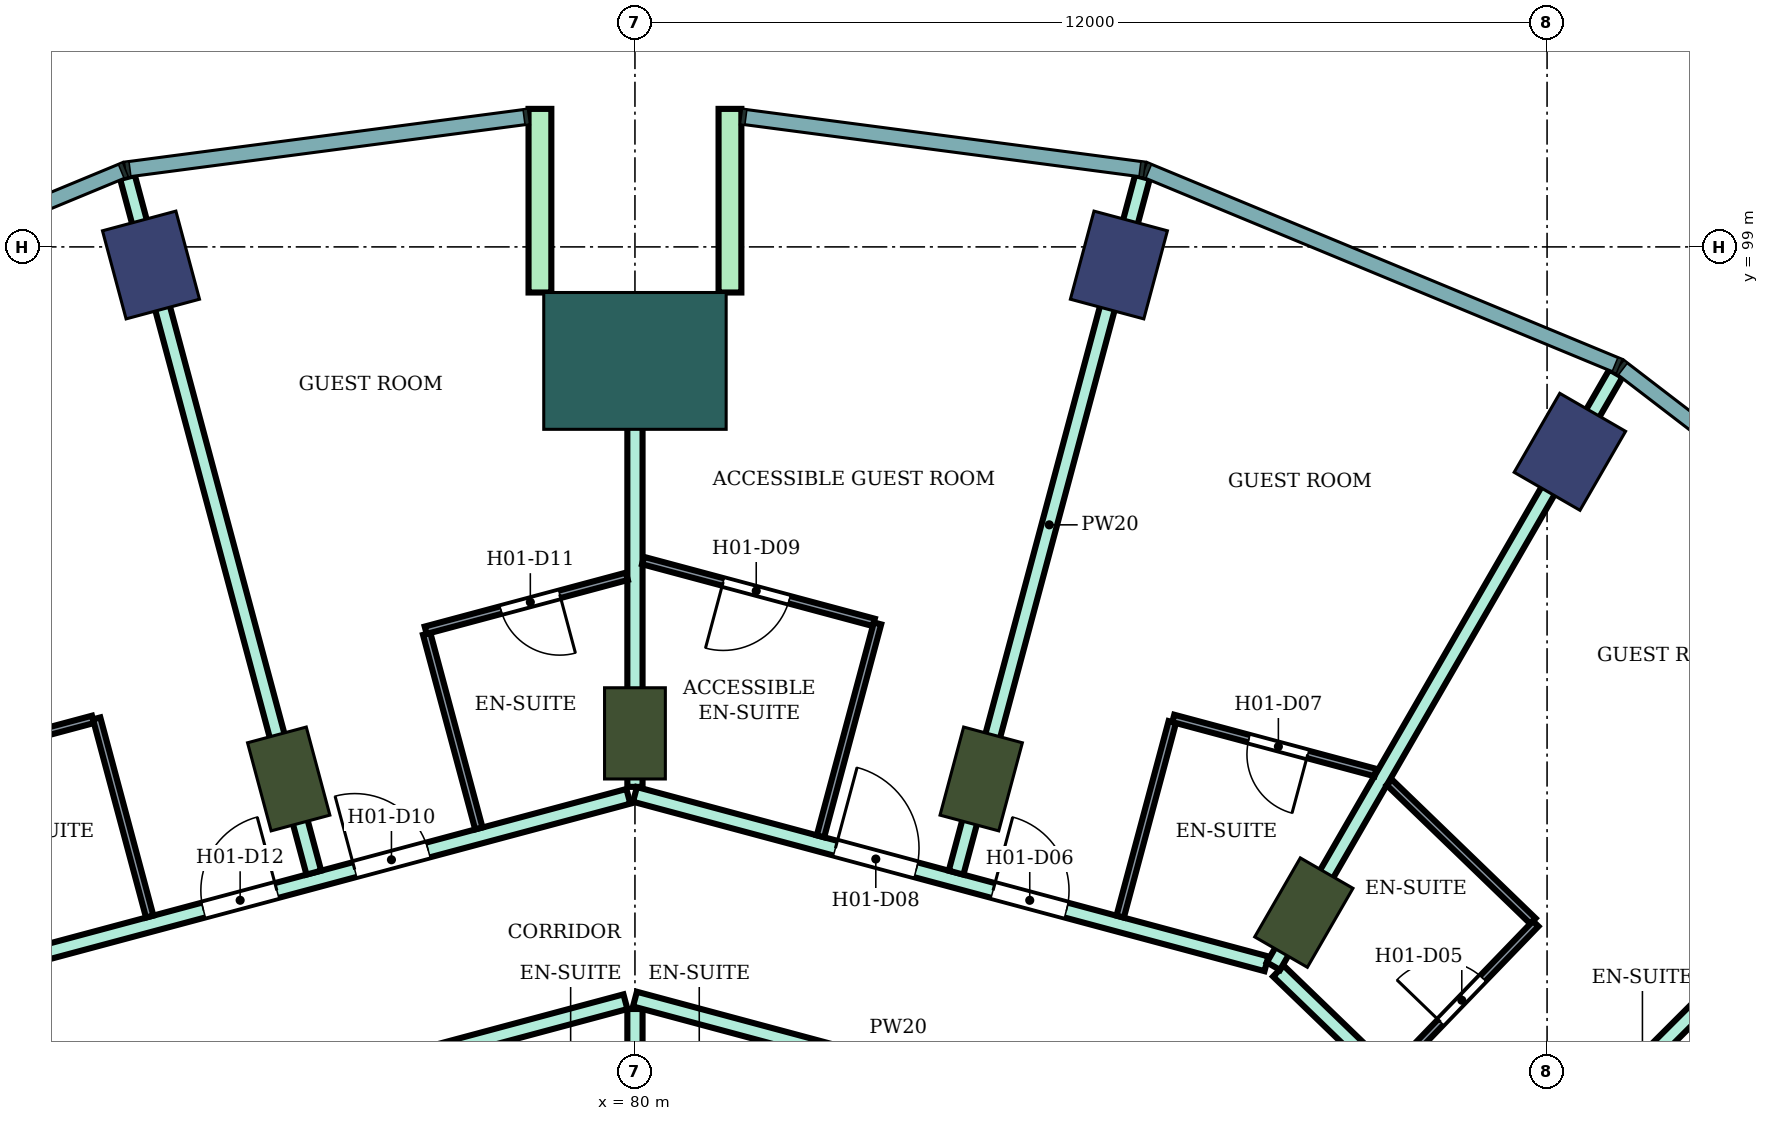
"""IFC4 building model, lengths in metres.
Left out: names, types, materials, properties, quantities, classifications, styles, units other than length and angle.
Written with IfcOpenShell. Run it as: python <this file> out.ifc"""

import sys

from ifc_helpers import new_model, si_unit, direction, frame, frame_2d, origin, origin_2d, place, context, subcontext, project, spatial, rectangle, extrude, element, fill, save


model = new_model("IFC4")
c1 = context("Model", 3, precision=1e-05, world=origin(), true_north=direction((0.0, 1.0)))
c2 = subcontext(c1, "Body", "Model", "MODEL_VIEW")
j1 = project(units=[si_unit("LENGTHUNIT", "METRE"), si_unit("PLANEANGLEUNIT", "RADIAN")], contexts=[c1])
p1 = place(None, origin())
s1 = spatial("IfcSite", under=j1, at=p1, CompositionType="ELEMENT")
p2 = place(p1, origin())
s2 = spatial("IfcBuilding", under=s1, at=p2, CompositionType="ELEMENT")
p3 = place(p2, frame((0.0, 0.0, 36.4)))
s3 = spatial("IfcBuildingStorey", under=s2, at=p3, CompositionType="ELEMENT", Elevation=36.4)
for number, where, z_axis, x_axis in (
    (1, (92.3, 96.304, 0.0), (0.0, 0.0, 1.0), (0.5, 0.866, 0.0)),
    (2, (86.367, 98.762, 0.0), (0.0, 0.0, 1.0), (0.259, 0.966, 0.0)),
    (3, (73.633, 98.762, 0.0), (0.0, 0.0, 1.0), (-0.259, 0.966, 0.0)),
):
    element("IfcColumn", number, at=place(p3, frame(where, z_axis=z_axis, x_axis=x_axis)), inside=s3, PredefinedType="COLUMN", context=c2, shape_type="SweptSolid", body=[
        extrude(rectangle(XDim=1.2, YDim=1.0, at=origin_2d()), origin(), (0.0, 0.0, 1.0), 3.8),
    ])
for number, where, z_axis, x_axis in (
    (4, (88.8, 90.242, 0.0), (0.0, 0.0, 1.0), (0.5, 0.866, 0.0)),
    (5, (84.555, 92.0, 0.0), (0.0, 0.0, 1.0), (0.259, 0.966, 0.0)),
    (6, (80.0, 92.6, 0.0), (0.0, 0.0, 1.0), (0.0, 1.0, 0.0)),
    (7, (75.445, 92.0, 0.0), (0.0, 0.0, 1.0), (-0.259, 0.966, 0.0)),
):
    element("IfcColumn", number, at=place(p3, frame(where, z_axis=z_axis, x_axis=x_axis)), inside=s3, PredefinedType="COLUMN", context=c2, shape_type="SweptSolid", body=[
        extrude(rectangle(XDim=1.2, YDim=0.8, at=origin_2d()), origin(), (0.0, 0.0, 1.0), 3.8),
    ])
p4 = place(p3, frame((80.0, 97.5, 0.0), z_axis=(0.0, 0.0, 1.0), x_axis=(0.0, 1.0, 0.0)))
e8 = element("IfcColumn", 8, at=p4, inside=s3, PredefinedType="COLUMN", context=c2, shape_type="SweptSolid", body=[
    extrude(rectangle(XDim=1.8, YDim=2.4, at=origin_2d()), origin(), (0.0, 0.0, 1.0), 3.8),
])
for number, where, z_axis, x_axis in (
    (9, (81.25, 98.4, 0.0), (0.0, 0.0, 1.0), (0.0, 1.0, 0.0)),
    (10, (78.75, 98.4, 0.0), (0.0, 0.0, 1.0), (0.0, 1.0, 0.0)),
):
    element("IfcWall", number, at=place(p3, frame(where, z_axis=z_axis, x_axis=x_axis)), inside=s3, PredefinedType="NOTDEFINED", context=c2, shape_type="SweptSolid", body=[
        extrude(rectangle(XDim=2.416, YDim=0.3, at=frame_2d((1.208, 0.0))), origin(), (0.0, 0.0, 1.0), 3.8),
    ])
p5 = place(p3, frame((71.614, 89.55, 0.0), z_axis=(0.0, 0.0, 1.0), x_axis=(0.965982156828, 0.258608725086, 0.0)))
e11 = element("IfcWall", 11, at=p5, inside=s3, PredefinedType="PARTITIONING", context=c2, shape_type="SweptSolid", body=[
    extrude(rectangle(XDim=8.592, YDim=0.2, at=frame_2d((4.296, 0.0))), origin(), (0.0, 0.0, 1.0), 3.35),
])
p6 = place(p5, frame((4.865, 0.0, 0.0)))
e12 = element("IfcOpeningElement", 12, at=p6, cuts=e11, PredefinedType="OPENING", context=c2, shape_type="SweptSolid", body=[
    extrude(rectangle(XDim=1.0, YDim=2.1, at=frame_2d((0.5, 1.05))), frame((0.0, 0.11, 0.0), z_axis=(0.0, -1.0, 0.0), x_axis=(1.0, 0.0, 0.0)), (0.0, 0.0, 1.0), 0.22),
])
p7 = place(p5, frame((2.804, 0.0, 0.0)))
e13 = element("IfcOpeningElement", 13, at=p7, cuts=e11, PredefinedType="OPENING", context=c2, shape_type="SweptSolid", body=[
    extrude(rectangle(XDim=1.0, YDim=2.1, at=frame_2d((0.5, 1.05))), frame((0.0, 0.11, 0.0), z_axis=(0.0, -1.0, 0.0), x_axis=(1.0, 0.0, 0.0)), (0.0, 0.0, 1.0), 0.22),
])
p8 = place(p3, frame((73.071, 87.247, 0.0), z_axis=(0.0, 0.0, 1.0), x_axis=(0.965931651205, 0.258797305243, 0.0)))
e14 = element("IfcWall", 14, at=p8, inside=s3, PredefinedType="PARTITIONING", context=c2, shape_type="SweptSolid", body=[
    extrude(rectangle(XDim=7.043, YDim=0.2, at=frame_2d((3.521, 0.0))), origin(), (0.0, 0.0, 1.0), 3.35),
])
p9 = place(p8, frame((0.41, 0.0, 0.0)))
e15 = element("IfcOpeningElement", 15, at=p9, cuts=e14, PredefinedType="OPENING", context=c2, shape_type="SweptSolid", body=[
    extrude(rectangle(XDim=1.0, YDim=2.1, at=frame_2d((0.5, 1.05))), frame((0.0, 0.11, 0.0), z_axis=(0.0, -1.0, 0.0), x_axis=(1.0, 0.0, 0.0)), (0.0, 0.0, 1.0), 0.22),
])
p10 = place(p3, frame((73.323, 99.919, 0.0), z_axis=(0.0, 0.0, 1.0), x_axis=(0.258817230439, -0.965926312525, 0.0)))
e16 = element("IfcWall", 16, at=p10, inside=s3, PredefinedType="PARTITIONING", context=c2, shape_type="SweptSolid", body=[
    extrude(rectangle(XDim=9.474, YDim=0.2, at=frame_2d((4.737, 0.0))), origin(), (0.0, 0.0, 1.0), 3.35),
])
p11 = place(p3, frame((80.0, 82.699, 0.0), z_axis=(0.0, 0.0, 1.0), x_axis=(0.0, 1.0, 0.0)))
e17 = element("IfcWall", 17, at=p11, inside=s3, PredefinedType="PARTITIONING", context=c2, shape_type="SweptSolid", body=[
    extrude(rectangle(XDim=6.275, YDim=0.2, at=frame_2d((3.138, 0.0))), origin(), (0.0, 0.0, 1.0), 3.35),
])
p12 = place(p3, frame((80.0, 89.104, 0.0), z_axis=(0.0, 0.0, 1.0), x_axis=(0.965856548257, -0.259077455964, 0.0)))
e18 = element("IfcWall", 18, at=p12, inside=s3, PredefinedType="PARTITIONING", context=c2, shape_type="SweptSolid", body=[
    extrude(rectangle(XDim=7.173, YDim=0.2, at=frame_2d((3.586, 0.0))), origin(), (0.0, 0.0, 1.0), 3.35),
])
p13 = place(p12, frame((5.763, 0.0, 0.0)))
e19 = element("IfcOpeningElement", 19, at=p13, cuts=e18, PredefinedType="OPENING", context=c2, shape_type="SweptSolid", body=[
    extrude(rectangle(XDim=1.0, YDim=2.1, at=frame_2d((0.5, 1.05))), frame((0.0, 0.11, 0.0), z_axis=(0.0, -1.0, 0.0), x_axis=(1.0, 0.0, 0.0)), (0.0, 0.0, 1.0), 0.22),
])
p14 = place(p3, frame((80.0, 91.896, 0.0), z_axis=(0.0, 0.0, 1.0), x_axis=(0.0, 1.0, 0.0)))
e20 = element("IfcWall", 20, at=p14, inside=s3, PredefinedType="PARTITIONING", context=c2, shape_type="SweptSolid", body=[
    extrude(rectangle(XDim=6.304, YDim=0.2, at=frame_2d((3.152, 0.0))), origin(), (0.0, 0.0, 1.0), 3.35),
])
p15 = place(p3, frame((80.0, 91.797, 0.0), z_axis=(0.0, 0.0, 1.0), x_axis=(0.965857042792, -0.259075612301, 0.0)))
e21 = element("IfcWall", 21, at=p15, inside=s3, PredefinedType="PARTITIONING", context=c2, shape_type="SweptSolid", body=[
    extrude(rectangle(XDim=8.602, YDim=0.2, at=frame_2d((4.301, 0.0))), origin(), (0.0, 0.0, 1.0), 3.35),
])
p16 = place(p15, frame((4.877, 0.0, 0.0)))
e22 = element("IfcOpeningElement", 22, at=p16, cuts=e21, PredefinedType="OPENING", context=c2, shape_type="SweptSolid", body=[
    extrude(rectangle(XDim=1.0, YDim=2.1, at=frame_2d((0.5, 1.05))), frame((0.0, 0.11, 0.0), z_axis=(0.0, -1.0, 0.0), x_axis=(1.0, 0.0, 0.0)), (0.0, 0.0, 1.0), 0.22),
])
p17 = place(p15, frame((2.73, 0.0, 0.0)))
e23 = element("IfcOpeningElement", 23, at=p17, cuts=e21, PredefinedType="OPENING", context=c2, shape_type="SweptSolid", body=[
    extrude(rectangle(XDim=1.1, YDim=2.1, at=frame_2d((0.55, 1.05))), frame((0.0, 0.11, 0.0), z_axis=(0.0, -1.0, 0.0), x_axis=(1.0, 0.0, 0.0)), (0.0, 0.0, 1.0), 0.22),
])
p18 = place(p3, frame((84.225, 90.768, 0.0), z_axis=(0.0, 0.0, 1.0), x_axis=(0.258817230439, 0.965926312525, 0.0)))
e24 = element("IfcWall", 24, at=p18, inside=s3, PredefinedType="PARTITIONING", context=c2, shape_type="SweptSolid", body=[
    extrude(rectangle(XDim=9.474, YDim=0.2, at=frame_2d((4.737, 0.0))), origin(), (0.0, 0.0, 1.0), 3.35),
])
p19 = place(p3, frame((88.465, 89.473, 0.0), z_axis=(0.0, 0.0, 1.0), x_axis=(0.719457552421, -0.694536413922, 0.0)))
e25 = element("IfcWall", 25, at=p19, inside=s3, PredefinedType="PARTITIONING", context=c2, shape_type="SweptSolid", body=[
    extrude(rectangle(XDim=6.524, YDim=0.2, at=frame_2d((3.262, 0.0))), origin(), (0.0, 0.0, 1.0), 3.35),
])
p20 = place(p19, frame((2.719, 0.0, 0.0)))
e26 = element("IfcOpeningElement", 26, at=p20, cuts=e25, PredefinedType="OPENING", context=c2, shape_type="SweptSolid", body=[
    extrude(rectangle(XDim=1.0, YDim=2.1, at=frame_2d((0.5, 1.05))), frame((0.0, 0.11, 0.0), z_axis=(0.0, -1.0, 0.0), x_axis=(1.0, 0.0, 0.0)), (0.0, 0.0, 1.0), 0.22),
])
p21 = place(p3, frame((88.4, 89.538, 0.0), z_axis=(0.0, 0.0, 1.0), x_axis=(0.5002401188, 0.865886726739, 0.0)))
e27 = element("IfcWall", 27, at=p21, inside=s3, PredefinedType="PARTITIONING", context=c2, shape_type="SweptSolid", body=[
    extrude(rectangle(XDim=9.008, YDim=0.2, at=frame_2d((4.504, 0.0))), origin(), (0.0, 0.0, 1.0), 3.35),
])
p22 = place(p3, frame((91.594, 86.591, 0.0), z_axis=(0.0, 0.0, 1.0), x_axis=(0.707214399597, 0.706999146394, 0.0)))
e28 = element("IfcWall", 28, at=p22, inside=s3, PredefinedType="PARTITIONING", context=c2, shape_type="SweptSolid", body=[
    extrude(rectangle(XDim=6.805, YDim=0.2, at=frame_2d((3.403, 0.0))), origin(), (0.0, 0.0, 1.0), 3.35),
])
p23 = place(p3, frame((70.268, 92.087, 0.0), z_axis=(0.0, 0.0, 1.0), x_axis=(0.965931867509, 0.258796497911, 0.0)))
e29 = element("IfcWall", 29, at=p23, inside=s3, PredefinedType="PARTITIONING", context=c2, shape_type="SweptSolid", body=[
    extrude(rectangle(XDim=2.693, YDim=0.1, at=frame_2d((1.347, 0.0))), origin(), (0.0, 0.0, 1.0), 3.35),
])
p24 = place(p23, frame((0.912, 0.0, 0.0)))
e30 = element("IfcOpeningElement", 30, at=p24, cuts=e29, PredefinedType="OPENING", context=c2, shape_type="SweptSolid", body=[
    extrude(rectangle(XDim=0.8, YDim=2.1, at=frame_2d((0.4, 1.05))), frame((0.0, 0.06, 0.0), z_axis=(0.0, -1.0, 0.0), x_axis=(1.0, 0.0, 0.0)), (0.0, 0.0, 1.0), 0.12),
])
p25 = place(p3, frame((72.918, 92.797, 0.0), z_axis=(0.0, 0.0, 1.0), x_axis=(0.25867580527, -0.965964195904, 0.0)))
e31 = element("IfcWall", 31, at=p25, inside=s3, PredefinedType="PARTITIONING", context=c2, shape_type="SweptSolid", body=[
    extrude(rectangle(XDim=2.699, YDim=0.1, at=frame_2d((1.35, 0.0))), origin(), (0.0, 0.0, 1.0), 3.35),
])
p26 = place(p3, frame((77.26, 93.909, 0.0), z_axis=(0.0, 0.0, 1.0), x_axis=(0.258935674139, -0.965894568086, 0.0)))
e32 = element("IfcWall", 32, at=p26, inside=s3, PredefinedType="PARTITIONING", context=c2, shape_type="SweptSolid", body=[
    extrude(rectangle(XDim=2.649, YDim=0.1, at=frame_2d((1.325, 0.0))), origin(), (0.0, 0.0, 1.0), 3.35),
])
p27 = place(p3, frame((77.247, 93.957, 0.0), z_axis=(0.0, 0.0, 1.0), x_axis=(0.965922199757, 0.258832579125, 0.0)))
e33 = element("IfcWall", 33, at=p27, inside=s3, PredefinedType="PARTITIONING", context=c2, shape_type="SweptSolid", body=[
    extrude(rectangle(XDim=2.74, YDim=0.1, at=frame_2d((1.37, 0.0))), origin(), (0.0, 0.0, 1.0), 3.35),
])
p28 = place(p27, frame((1.025, 0.0, 0.0)))
e34 = element("IfcOpeningElement", 34, at=p28, cuts=e33, PredefinedType="OPENING", context=c2, shape_type="SweptSolid", body=[
    extrude(rectangle(XDim=0.8, YDim=2.1, at=frame_2d((0.4, 1.05))), frame((0.0, 0.06, 0.0), z_axis=(0.0, -1.0, 0.0), x_axis=(1.0, 0.0, 0.0)), (0.0, 0.0, 1.0), 0.12),
])
p29 = place(p3, frame((80.106, 94.874, 0.0), z_axis=(0.0, 0.0, 1.0), x_axis=(0.965915808883, -0.258856427676, 0.0)))
e35 = element("IfcWall", 35, at=p29, inside=s3, PredefinedType="PARTITIONING", context=c2, shape_type="SweptSolid", body=[
    extrude(rectangle(XDim=3.144, YDim=0.1, at=frame_2d((1.572, 0.0))), origin(), (0.0, 0.0, 1.0), 3.35),
])
p30 = place(p29, frame((1.092, 0.0, 0.0)))
e36 = element("IfcOpeningElement", 36, at=p30, cuts=e35, PredefinedType="OPENING", context=c2, shape_type="SweptSolid", body=[
    extrude(rectangle(XDim=0.9, YDim=2.1, at=frame_2d((0.45, 1.05))), frame((0.0, 0.06, 0.0), z_axis=(0.0, -1.0, 0.0), x_axis=(1.0, 0.0, 0.0)), (0.0, 0.0, 1.0), 0.12),
])
p31 = place(p3, frame((82.441, 91.246, 0.0), z_axis=(0.0, 0.0, 1.0), x_axis=(0.258605640326, 0.965982982662, 0.0)))
e37 = element("IfcWall", 37, at=p31, inside=s3, PredefinedType="PARTITIONING", context=c2, shape_type="SweptSolid", body=[
    extrude(rectangle(XDim=2.9, YDim=0.1, at=frame_2d((1.45, 0.0))), origin(), (0.0, 0.0, 1.0), 3.35),
])
p32 = place(p3, frame((86.384, 90.19, 0.0), z_axis=(0.0, 0.0, 1.0), x_axis=(0.258677737588, 0.965963678446, 0.0)))
e38 = element("IfcWall", 38, at=p32, inside=s3, PredefinedType="PARTITIONING", context=c2, shape_type="SweptSolid", body=[
    extrude(rectangle(XDim=2.649, YDim=0.1, at=frame_2d((1.325, 0.0))), origin(), (0.0, 0.0, 1.0), 3.35),
])
p33 = place(p3, frame((87.082, 92.797, 0.0), z_axis=(0.0, 0.0, 1.0), x_axis=(0.965926679745, -0.258815859939, 0.0)))
e39 = element("IfcWall", 39, at=p33, inside=s3, PredefinedType="PARTITIONING", context=c2, shape_type="SweptSolid", body=[
    extrude(rectangle(XDim=2.753, YDim=0.1, at=frame_2d((1.377, 0.0))), origin(), (0.0, 0.0, 1.0), 3.35),
])
p34 = place(p33, frame((1.032, 0.0, 0.0)))
e40 = element("IfcOpeningElement", 40, at=p34, cuts=e39, PredefinedType="OPENING", context=c2, shape_type="SweptSolid", body=[
    extrude(rectangle(XDim=0.8, YDim=2.1, at=frame_2d((0.4, 1.05))), frame((0.0, 0.06, 0.0), z_axis=(0.0, -1.0, 0.0), x_axis=(1.0, 0.0, 0.0)), (0.0, 0.0, 1.0), 0.12),
])
p35 = place(p3, frame((89.925, 91.956, 0.0), z_axis=(0.0, 0.0, 1.0), x_axis=(0.71935982196, -0.694637636865, 0.0)))
e41 = element("IfcWall", 41, at=p35, inside=s3, PredefinedType="PARTITIONING", context=c2, shape_type="SweptSolid", body=[
    extrude(rectangle(XDim=2.627, YDim=0.1, at=frame_2d((1.313, 0.0))), origin(), (0.0, 0.0, 1.0), 3.35),
])
p36 = place(p3, frame((89.976, 88.154, 0.0), z_axis=(0.0, 0.0, 1.0), x_axis=(0.6945137956, 0.719479386585, 0.0)))
e42 = element("IfcWall", 42, at=p36, inside=s3, PredefinedType="PARTITIONING", context=c2, shape_type="SweptSolid", body=[
    extrude(rectangle(XDim=2.699, YDim=0.1, at=frame_2d((1.35, 0.0))), origin(), (0.0, 0.0, 1.0), 3.35),
])
p37 = place(p36, frame((0.9, 0.0, 0.0)))
e43 = element("IfcOpeningElement", 43, at=p37, cuts=e42, PredefinedType="OPENING", context=c2, shape_type="SweptSolid", body=[
    extrude(rectangle(XDim=0.8, YDim=2.1, at=frame_2d((0.4, 1.05))), frame((0.0, 0.06, 0.0), z_axis=(0.0, -1.0, 0.0), x_axis=(1.0, 0.0, 0.0)), (0.0, 0.0, 1.0), 0.12),
])
p38 = place(p37, origin())
e44 = element("IfcDoor", 44, at=p38, inside=s3, OperationType="SINGLE_SWING_LEFT", PredefinedType="DOOR", context=c2, shape_type="SweptSolid", body=[
    extrude(rectangle(XDim=0.8, YDim=2.1, at=frame_2d((0.4, 1.05))), frame((0.0, 0.025, 0.0), z_axis=(0.0, -1.0, 0.0), x_axis=(1.0, 0.0, 0.0)), (0.0, 0.0, 1.0), 0.05),
])
fill(e43, e44)
p39 = place(p16, origin())
e45 = element("IfcDoor", 45, at=p39, inside=s3, OperationType="SINGLE_SWING_LEFT", PredefinedType="DOOR", context=c2, shape_type="SweptSolid", body=[
    extrude(rectangle(XDim=1.0, YDim=2.1, at=frame_2d((0.5, 1.05))), frame((0.0, 0.025, 0.0), z_axis=(0.0, -1.0, 0.0), x_axis=(1.0, 0.0, 0.0)), (0.0, 0.0, 1.0), 0.05),
])
fill(e22, e45)
p40 = place(p34, frame((0.8, 0.0, 0.0), z_axis=(0.0, 0.0, 1.0), x_axis=(-1.0, 0.0, 0.0)))
e46 = element("IfcDoor", 46, at=p40, inside=s3, OperationType="SINGLE_SWING_LEFT", PredefinedType="DOOR", context=c2, shape_type="SweptSolid", body=[
    extrude(rectangle(XDim=0.8, YDim=2.1, at=frame_2d((0.4, 1.05))), frame((0.0, 0.025, 0.0), z_axis=(0.0, -1.0, 0.0), x_axis=(1.0, 0.0, 0.0)), (0.0, 0.0, 1.0), 0.05),
])
fill(e40, e46)
p41 = place(p17, origin())
e47 = element("IfcDoor", 47, at=p41, inside=s3, OperationType="SINGLE_SWING_LEFT", PredefinedType="DOOR", context=c2, shape_type="SweptSolid", body=[
    extrude(rectangle(XDim=1.1, YDim=2.1, at=frame_2d((0.55, 1.05))), frame((0.0, 0.025, 0.0), z_axis=(0.0, -1.0, 0.0), x_axis=(1.0, 0.0, 0.0)), (0.0, 0.0, 1.0), 0.05),
])
fill(e23, e47)
p42 = place(p30, frame((0.9, 0.0, 0.0), z_axis=(0.0, 0.0, 1.0), x_axis=(-1.0, 0.0, 0.0)))
e48 = element("IfcDoor", 48, at=p42, inside=s3, OperationType="SINGLE_SWING_RIGHT", PredefinedType="DOOR", context=c2, shape_type="SweptSolid", body=[
    extrude(rectangle(XDim=0.9, YDim=2.1, at=frame_2d((0.45, 1.05))), frame((0.0, 0.025, 0.0), z_axis=(0.0, -1.0, 0.0), x_axis=(1.0, 0.0, 0.0)), (0.0, 0.0, 1.0), 0.05),
])
fill(e36, e48)
p43 = place(p6, origin())
e49 = element("IfcDoor", 49, at=p43, inside=s3, OperationType="SINGLE_SWING_LEFT", PredefinedType="DOOR", context=c2, shape_type="SweptSolid", body=[
    extrude(rectangle(XDim=1.0, YDim=2.1, at=frame_2d((0.5, 1.05))), frame((0.0, 0.025, 0.0), z_axis=(0.0, -1.0, 0.0), x_axis=(1.0, 0.0, 0.0)), (0.0, 0.0, 1.0), 0.05),
])
fill(e12, e49)
p44 = place(p28, frame((0.8, 0.0, 0.0), z_axis=(0.0, 0.0, 1.0), x_axis=(-1.0, 0.0, 0.0)))
e50 = element("IfcDoor", 50, at=p44, inside=s3, OperationType="SINGLE_SWING_LEFT", PredefinedType="DOOR", context=c2, shape_type="SweptSolid", body=[
    extrude(rectangle(XDim=0.8, YDim=2.1, at=frame_2d((0.4, 1.05))), frame((0.0, 0.025, 0.0), z_axis=(0.0, -1.0, 0.0), x_axis=(1.0, 0.0, 0.0)), (0.0, 0.0, 1.0), 0.05),
])
fill(e34, e50)
p45 = place(p7, origin())
e51 = element("IfcDoor", 51, at=p45, inside=s3, OperationType="SINGLE_SWING_RIGHT", PredefinedType="DOOR", context=c2, shape_type="SweptSolid", body=[
    extrude(rectangle(XDim=1.0, YDim=2.1, at=frame_2d((0.5, 1.05))), frame((0.0, 0.025, 0.0), z_axis=(0.0, -1.0, 0.0), x_axis=(1.0, 0.0, 0.0)), (0.0, 0.0, 1.0), 0.05),
])
fill(e13, e51)
save(model, sys.argv[1])
